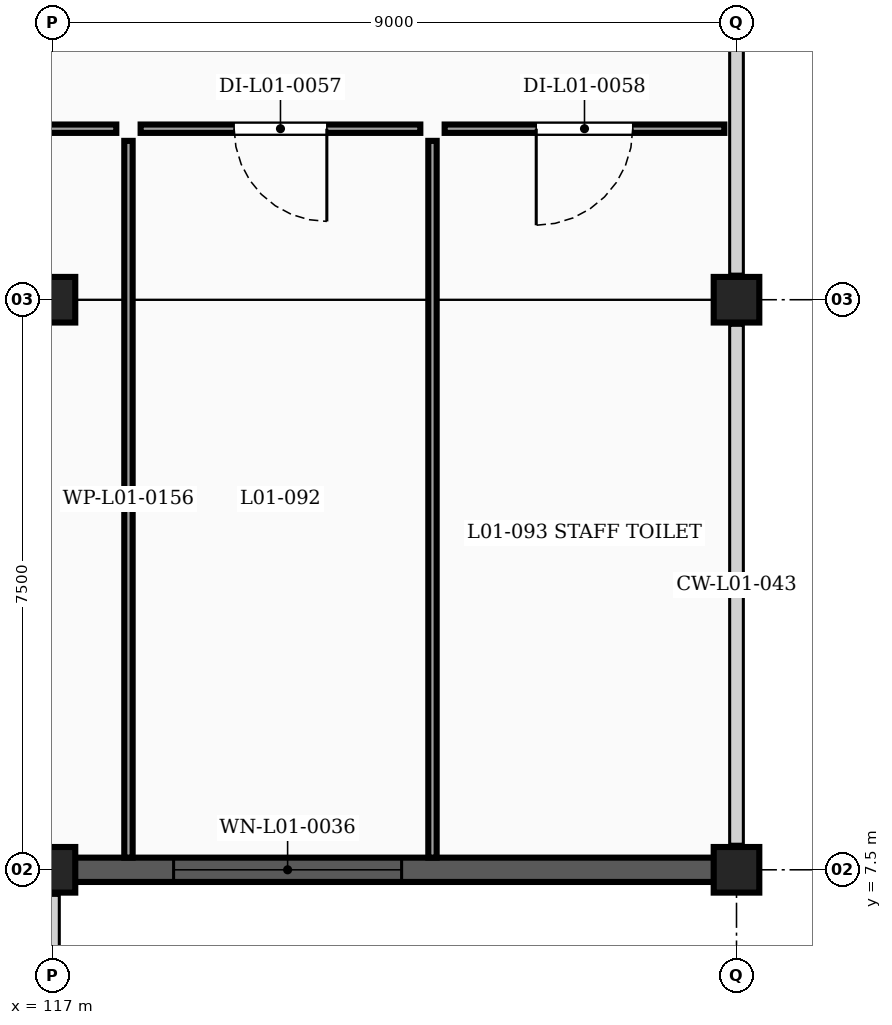
"""IFC4 building model, lengths in metres.
Left out: names, types, materials, properties, quantities, classifications, styles, units other than length and angle.
Written with IfcOpenShell. Run it as: python <this file> out.ifc"""

import sys

from ifc_helpers import new_model, si_unit, direction, frame, frame_2d, origin, origin_2d, place, context, subcontext, project, spatial, rectangle, extrude, element, fill, save


model = new_model("IFC4")
c1 = context("Model", 3, precision=1e-05, world=origin(), true_north=direction((0.0, 1.0)))
c2 = subcontext(c1, "Body", "Model", "MODEL_VIEW")
j1 = project(units=[si_unit("LENGTHUNIT", "METRE"), si_unit("PLANEANGLEUNIT", "RADIAN")], contexts=[c1])
p1 = place(None, origin())
s1 = spatial("IfcSite", under=j1, at=p1, CompositionType="ELEMENT")
p2 = place(p1, origin())
s2 = spatial("IfcBuilding", under=s1, at=p2, CompositionType="ELEMENT")
p3 = place(p2, frame((0.0, 0.0, 4.5)))
s3 = spatial("IfcBuildingStorey", under=s2, at=p3, CompositionType="ELEMENT", Elevation=4.5)
for number, where, z_axis, x_axis in (
    (1, (117.0, 7.5, 0.0), (0.0, 0.0, 1.0), (1.0, 0.0, 0.0)),
    (2, (126.0, 7.5, 0.0), (0.0, 0.0, 1.0), (1.0, 0.0, 0.0)),
    (3, (117.0, 15.0, 0.0), (0.0, 0.0, 1.0), (1.0, 0.0, 0.0)),
    (4, (126.0, 15.0, 0.0), (0.0, 0.0, 1.0), (1.0, 0.0, 0.0)),
):
    element("IfcColumn", number, at=place(p3, frame(where, z_axis=z_axis, x_axis=x_axis)), inside=s3, PredefinedType="COLUMN", context=c2, shape_type="SweptSolid", body=[
        extrude(rectangle(XDim=0.6, YDim=0.6, at=origin_2d()), origin(), (0.0, 0.0, 1.0), 4.0),
    ])
p4 = place(p3, frame((125.704, 7.5, 0.0), z_axis=(0.0, 0.0, 1.0), x_axis=(-1.0, 0.0, 0.0)))
e5 = element("IfcWall", 5, at=p4, inside=s3, PredefinedType="SOLIDWALL", context=c2, shape_type="SweptSolid", body=[
    extrude(rectangle(XDim=8.408, YDim=0.32, at=frame_2d((4.204, 0.0))), origin(), (0.0, 0.0, 1.0), 3.77),
])
p5 = place(p4, frame((4.11, 0.0, 2.47)))
e6 = element("IfcOpeningElement", 6, at=p5, cuts=e5, PredefinedType="OPENING", context=c2, shape_type="SweptSolid", body=[
    extrude(rectangle(XDim=3.0, YDim=1.1, at=frame_2d((1.5, 0.55))), frame((0.0, 0.17, 0.0), z_axis=(0.0, -1.0, 0.0), x_axis=(1.0, 0.0, 0.0)), (0.0, 0.0, 1.0), 0.34),
])
p6 = place(p3, frame((118.0, 7.66, 0.0), z_axis=(0.0, 0.0, 1.0), x_axis=(0.0, 1.0, 0.0)))
e7 = element("IfcWall", 7, at=p6, inside=s3, PredefinedType="PARTITIONING", context=c2, shape_type="SweptSolid", body=[
    extrude(rectangle(XDim=9.43, YDim=0.11, at=frame_2d((4.715, 0.0))), origin(), (0.0, 0.0, 1.0), 3.77),
])
p7 = place(p3, frame((117.84, 17.25, 0.0), z_axis=(0.0, 0.0, 1.0), x_axis=(-1.0, 0.0, 0.0)))
e8 = element("IfcWall", 8, at=p7, inside=s3, PredefinedType="PARTITIONING", context=c2, shape_type="SweptSolid", body=[
    extrude(rectangle(XDim=3.68, YDim=0.11, at=frame_2d((1.84, 0.0))), origin(), (0.0, 0.0, 1.0), 3.77),
])
p8 = place(p3, frame((122.0, 7.66, 0.0), z_axis=(0.0, 0.0, 1.0), x_axis=(0.0, 1.0, 0.0)))
e9 = element("IfcWall", 9, at=p8, inside=s3, PredefinedType="PARTITIONING", context=c2, shape_type="SweptSolid", body=[
    extrude(rectangle(XDim=9.43, YDim=0.11, at=frame_2d((4.715, 0.0))), origin(), (0.0, 0.0, 1.0), 3.77),
])
p9 = place(p3, frame((121.84, 17.25, 0.0), z_axis=(0.0, 0.0, 1.0), x_axis=(-1.0, 0.0, 0.0)))
e10 = element("IfcWall", 10, at=p9, inside=s3, PredefinedType="PARTITIONING", context=c2, shape_type="SweptSolid", body=[
    extrude(rectangle(XDim=3.68, YDim=0.11, at=frame_2d((1.84, 0.0))), origin(), (0.0, 0.0, 1.0), 3.77),
])
p10 = place(p9, frame((1.23, 0.0, 0.0)))
e11 = element("IfcOpeningElement", 11, at=p10, cuts=e10, PredefinedType="OPENING", context=c2, shape_type="SweptSolid", body=[
    extrude(rectangle(XDim=1.22, YDim=2.16, at=frame_2d((0.61, 1.08))), frame((0.0, 0.065, 0.0), z_axis=(0.0, -1.0, 0.0), x_axis=(1.0, 0.0, 0.0)), (0.0, 0.0, 1.0), 0.13),
])
p11 = place(p3, frame((125.84, 17.25, 0.0), z_axis=(0.0, 0.0, 1.0), x_axis=(-1.0, 0.0, 0.0)))
e12 = element("IfcWall", 12, at=p11, inside=s3, PredefinedType="PARTITIONING", context=c2, shape_type="SweptSolid", body=[
    extrude(rectangle(XDim=3.68, YDim=0.11, at=frame_2d((1.84, 0.0))), origin(), (0.0, 0.0, 1.0), 3.77),
])
p12 = place(p11, frame((1.205, 0.0, 0.0)))
e13 = element("IfcOpeningElement", 13, at=p12, cuts=e12, PredefinedType="OPENING", context=c2, shape_type="SweptSolid", body=[
    extrude(rectangle(XDim=1.27, YDim=2.16, at=frame_2d((0.635, 1.08))), frame((0.0, 0.065, 0.0), z_axis=(0.0, -1.0, 0.0), x_axis=(1.0, 0.0, 0.0)), (0.0, 0.0, 1.0), 0.13),
])
p13 = place(p5, origin())
e14 = element("IfcWindow", 14, at=p13, inside=s3, PartitioningType="TRIPLE_PANEL_VERTICAL", PredefinedType="WINDOW", context=c2, shape_type="SweptSolid", body=[
    extrude(rectangle(XDim=3.0, YDim=1.1, at=frame_2d((1.5, 0.55))), frame((0.0, 0.03, 0.0), z_axis=(0.0, -1.0, 0.0), x_axis=(1.0, 0.0, 0.0)), (0.0, 0.0, 1.0), 0.06),
])
fill(e6, e14)
p14 = place(p10, origin())
e15 = element("IfcDoor", 15, at=p14, inside=s3, OperationType="SINGLE_SWING_LEFT", PredefinedType="DOOR", context=c2, shape_type="SweptSolid", body=[
    extrude(rectangle(XDim=1.22, YDim=2.16, at=frame_2d((0.61, 1.08))), frame((0.0, 0.025, 0.0), z_axis=(0.0, -1.0, 0.0), x_axis=(1.0, 0.0, 0.0)), (0.0, 0.0, 1.0), 0.05),
])
fill(e11, e15)
p15 = place(p12, origin())
e16 = element("IfcDoor", 16, at=p15, inside=s3, OperationType="SINGLE_SWING_RIGHT", PredefinedType="DOOR", context=c2, shape_type="SweptSolid", body=[
    extrude(rectangle(XDim=1.27, YDim=2.16, at=frame_2d((0.635, 1.08))), frame((0.0, 0.025, 0.0), z_axis=(0.0, -1.0, 0.0), x_axis=(1.0, 0.0, 0.0)), (0.0, 0.0, 1.0), 0.05),
])
fill(e13, e16)
save(model, sys.argv[1])
